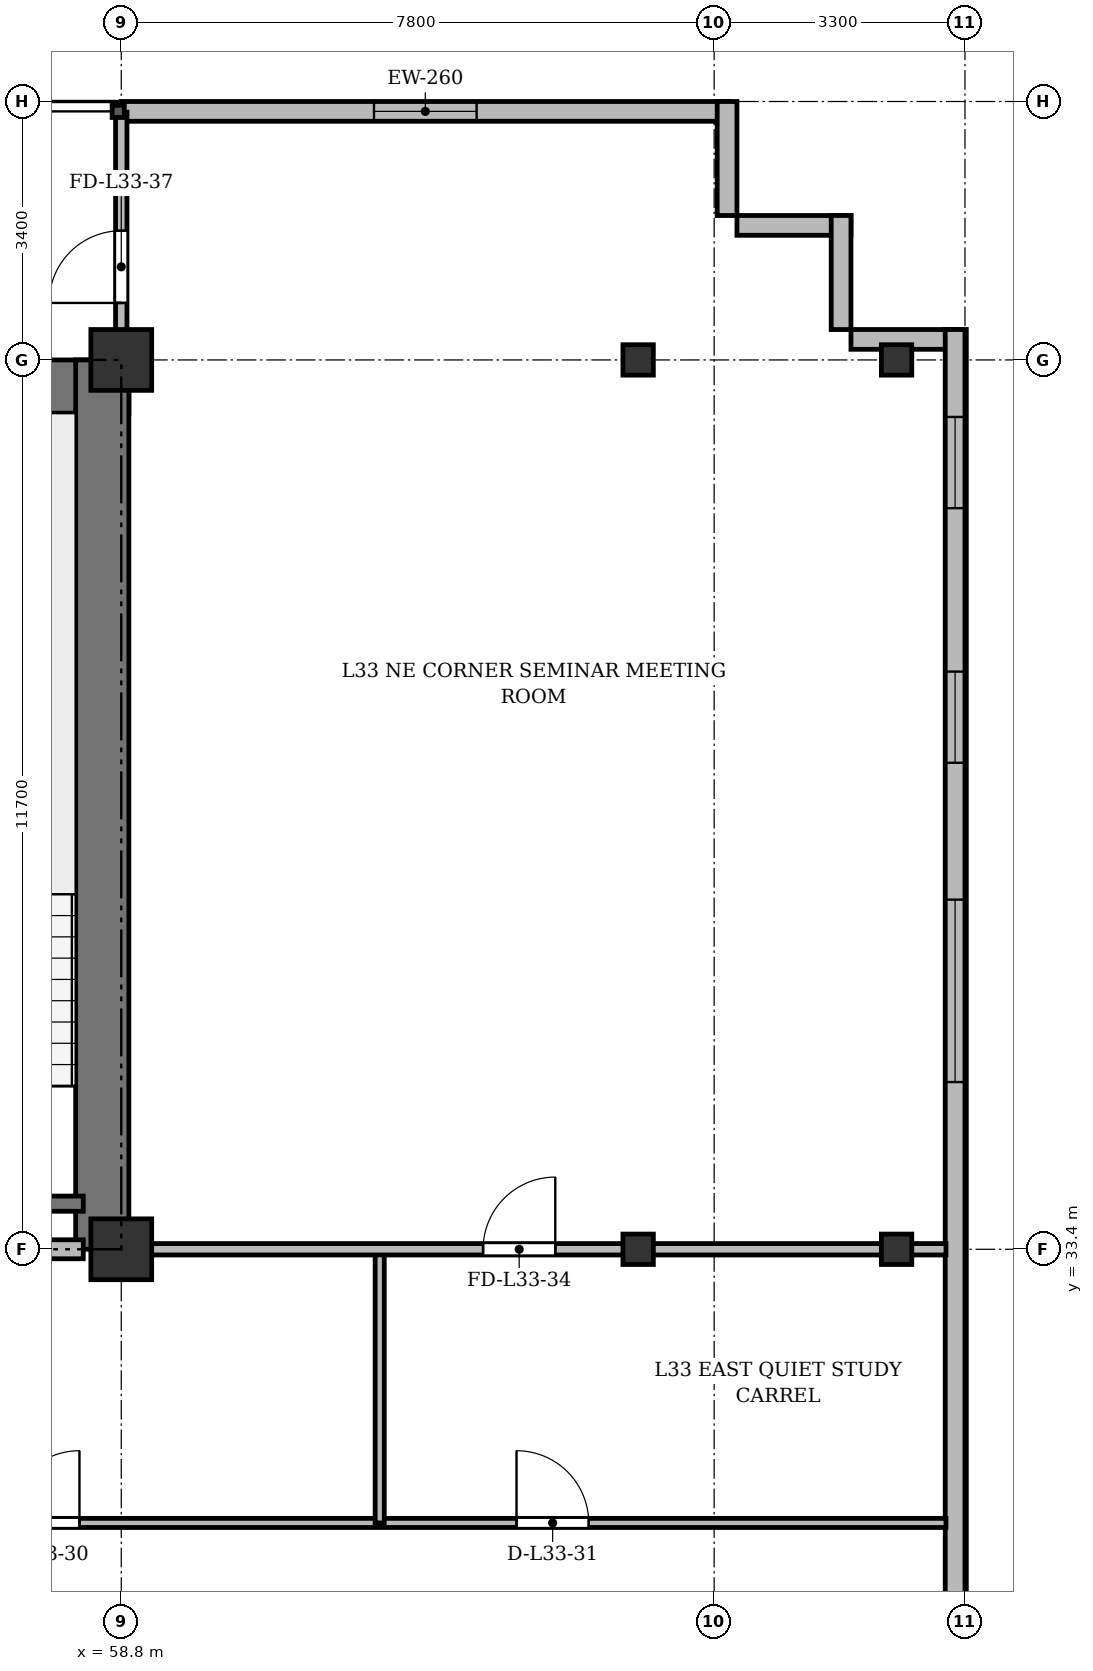
"""IFC4 building model, lengths in metres.
Left out: names, types, materials, properties, quantities, classifications, styles, units other than length and angle.
Written with IfcOpenShell. Run it as: python <this file> out.ifc"""

import sys

from ifc_helpers import new_model, si_unit, direction, frame, frame_2d, origin, origin_2d, place, context, subcontext, project, spatial, rectangle, i_section, extrude, source, transform, mapped, element, fill, save


model = new_model("IFC4")
c1 = context("Model", 3, precision=1e-05, world=origin(), true_north=direction((0.0, 1.0)))
c2 = subcontext(c1, "Body", "Model", "MODEL_VIEW")
j1 = project(units=[si_unit("LENGTHUNIT", "METRE"), si_unit("PLANEANGLEUNIT", "RADIAN")], contexts=[c1])
p1 = place(None, origin())
s1 = spatial("IfcSite", under=j1, at=p1, CompositionType="ELEMENT")
p2 = place(p1, origin())
s2 = spatial("IfcBuilding", under=s1, at=p2, CompositionType="ELEMENT")
p3 = place(p2, frame((0.0, 0.0, 128.5)))
s3 = spatial("IfcBuildingStorey", under=s2, at=p3, CompositionType="ELEMENT", Elevation=128.5)
m1 = source(origin(), c2, "Body", "SweptSolid", [
    extrude(rectangle(XDim=0.8, YDim=0.8, at=origin_2d()), origin(), (0.0, 0.0, 1.0), 3.6),
])
for number, where, z_axis, x_axis in (
    (1, (58.8, 33.4, 0.0), (0.0, 0.0, 1.0), (1.0, 0.0, 0.0)),
    (2, (58.8, 45.1, 0.0), (0.0, 0.0, 1.0), (1.0, 0.0, 0.0)),
):
    element("IfcColumn", number, at=place(p3, frame(where, z_axis=z_axis, x_axis=x_axis)), inside=s3, PredefinedType="COLUMN", context=c2, shape_type="MappedRepresentation", body=[
        mapped(m1, transform((0.0, 0.0, 0.0), x_axis=(1.0, 0.0, 0.0), y_axis=(0.0, 1.0, 0.0), z_axis=(0.0, 0.0, 1.0), scale=1.0)),
    ])
m2 = source(origin(), c2, "Body", "SweptSolid", [
    extrude(i_section(OverallWidth=0.4, OverallDepth=0.4, WebThickness=0.022, FlangeThickness=0.035, at=origin_2d()), origin(), (0.0, 0.0, 1.0), 3.6),
])
for number, where, z_axis, x_axis in (
    (3, (65.6, 33.4, 0.0), (0.0, 0.0, 1.0), (1.0, 0.0, 0.0)),
    (4, (65.6, 45.1, 0.0), (0.0, 0.0, 1.0), (1.0, 0.0, 0.0)),
    (5, (69.0, 33.4, 0.0), (0.0, 0.0, 1.0), (1.0, 0.0, 0.0)),
    (6, (69.0, 45.1, 0.0), (0.0, 0.0, 1.0), (1.0, 0.0, 0.0)),
):
    element("IfcColumn", number, at=place(p3, frame(where, z_axis=z_axis, x_axis=x_axis)), inside=s3, PredefinedType="COLUMN", context=c2, shape_type="MappedRepresentation", body=[
        mapped(m2, transform((0.0, 0.0, 0.0), x_axis=(1.0, 0.0, 0.0), y_axis=(0.0, 1.0, 0.0), z_axis=(0.0, 0.0, 1.0), scale=1.0)),
    ])
p4 = place(p3, frame((58.8, 48.37, 0.0), z_axis=(0.0, 0.0, 1.0), x_axis=(1.0, 0.0, 0.0)))
e7 = element("IfcWall", 7, at=p4, inside=s3, PredefinedType="SOLIDWALL", context=c2, shape_type="SweptSolid", body=[
    extrude(rectangle(XDim=8.0, YDim=0.26, at=frame_2d((4.0, 0.0))), origin(), (0.0, 0.0, 1.0), 3.22),
])
p5 = place(p4, frame((3.325, 0.0, 0.9)))
e8 = element("IfcOpeningElement", 8, at=p5, cuts=e7, PredefinedType="OPENING", context=c2, shape_type="SweptSolid", body=[
    extrude(rectangle(XDim=1.35, YDim=1.5, at=frame_2d((0.675, 0.75))), frame((0.0, 0.14, 0.0), z_axis=(0.0, -1.0, 0.0), x_axis=(1.0, 0.0, 0.0)), (0.0, 0.0, 1.0), 0.28),
])
for number, where, z_axis, x_axis in (
    (9, (66.77, 48.5, 0.0), (0.0, 0.0, 1.0), (0.0, -1.0, 0.0)),
    (10, (66.9, 46.87, 0.0), (0.0, 0.0, 1.0), (1.0, 0.0, 0.0)),
    (11, (68.27, 47.0, 0.0), (0.0, 0.0, 1.0), (0.0, -1.0, 0.0)),
):
    element("IfcWall", number, at=place(p3, frame(where, z_axis=z_axis, x_axis=x_axis)), inside=s3, PredefinedType="SOLIDWALL", context=c2, shape_type="SweptSolid", body=[
        extrude(rectangle(XDim=1.5, YDim=0.26, at=frame_2d((0.75, 0.0))), origin(), (0.0, 0.0, 1.0), 3.22),
    ])
p6 = place(p3, frame((68.4, 45.37, 0.0), z_axis=(0.0, 0.0, 1.0), x_axis=(1.0, 0.0, 0.0)))
e12 = element("IfcWall", 12, at=p6, inside=s3, PredefinedType="SOLIDWALL", context=c2, shape_type="SweptSolid", body=[
    extrude(rectangle(XDim=1.5, YDim=0.26, at=frame_2d((0.75, 0.0))), origin(), (0.0, 0.0, 1.0), 2.632),
])
p7 = place(p3, frame((69.77, 45.5, 0.0), z_axis=(0.0, 0.0, 1.0), x_axis=(0.0, -1.0, 0.0)))
e13 = element("IfcWall", 13, at=p7, inside=s3, PredefinedType="SOLIDWALL", context=c2, shape_type="SweptSolid", body=[
    extrude(rectangle(XDim=39.6, YDim=0.26, at=frame_2d((19.8, 0.0))), origin(), (0.0, 0.0, 1.0), 2.632),
])
p8 = place(p7, frame((36.95, 0.0, 0.92)))
e14 = element("IfcOpeningElement", 14, at=p8, cuts=e13, PredefinedType="OPENING", context=c2, shape_type="SweptSolid", body=[
    extrude(rectangle(XDim=1.2, YDim=1.61, at=frame_2d((0.6, 0.805))), frame((0.0, 0.14, 0.0), z_axis=(0.0, -1.0, 0.0), x_axis=(1.0, 0.0, 0.0)), (0.0, 0.0, 1.0), 0.28),
])
p9 = place(p7, frame((32.9, 0.0, 0.92)))
e15 = element("IfcOpeningElement", 15, at=p9, cuts=e13, PredefinedType="OPENING", context=c2, shape_type="SweptSolid", body=[
    extrude(rectangle(XDim=2.4, YDim=1.61, at=frame_2d((1.2, 0.805))), frame((0.0, 0.14, 0.0), z_axis=(0.0, -1.0, 0.0), x_axis=(1.0, 0.0, 0.0)), (0.0, 0.0, 1.0), 0.28),
])
p10 = place(p7, frame((28.7, 0.0, 0.92)))
e16 = element("IfcOpeningElement", 16, at=p10, cuts=e13, PredefinedType="OPENING", context=c2, shape_type="SweptSolid", body=[
    extrude(rectangle(XDim=2.4, YDim=1.61, at=frame_2d((1.2, 0.805))), frame((0.0, 0.14, 0.0), z_axis=(0.0, -1.0, 0.0), x_axis=(1.0, 0.0, 0.0)), (0.0, 0.0, 1.0), 0.28),
])
p11 = place(p7, frame((7.5, 0.0, 0.92)))
e17 = element("IfcOpeningElement", 17, at=p11, cuts=e13, PredefinedType="OPENING", context=c2, shape_type="SweptSolid", body=[
    extrude(rectangle(XDim=2.4, YDim=1.61, at=frame_2d((1.2, 0.805))), frame((0.0, 0.14, 0.0), z_axis=(0.0, -1.0, 0.0), x_axis=(1.0, 0.0, 0.0)), (0.0, 0.0, 1.0), 0.28),
])
p12 = place(p7, frame((4.5, 0.0, 0.92)))
e18 = element("IfcOpeningElement", 18, at=p12, cuts=e13, PredefinedType="OPENING", context=c2, shape_type="SweptSolid", body=[
    extrude(rectangle(XDim=1.2, YDim=1.61, at=frame_2d((0.6, 0.805))), frame((0.0, 0.14, 0.0), z_axis=(0.0, -1.0, 0.0), x_axis=(1.0, 0.0, 0.0)), (0.0, 0.0, 1.0), 0.28),
])
p13 = place(p7, frame((1.15, 0.0, 0.92)))
e19 = element("IfcOpeningElement", 19, at=p13, cuts=e13, PredefinedType="OPENING", context=c2, shape_type="SweptSolid", body=[
    extrude(rectangle(XDim=1.2, YDim=1.61, at=frame_2d((0.6, 0.805))), frame((0.0, 0.14, 0.0), z_axis=(0.0, -1.0, 0.0), x_axis=(1.0, 0.0, 0.0)), (0.0, 0.0, 1.0), 0.28),
])
p14 = place(p3, frame((15.5, 44.75, 0.0), z_axis=(0.0, 0.0, 1.0), x_axis=(1.0, 0.0, 0.0)))
e20 = element("IfcWall", 20, at=p14, inside=s3, PredefinedType="SHEAR", context=c2, shape_type="SweptSolid", body=[
    extrude(rectangle(XDim=43.4, YDim=0.7, at=frame_2d((21.7, 0.0))), origin(), (0.0, 0.0, 1.0), 3.22),
])
p15 = place(p3, frame((58.55, 33.4, 0.0), z_axis=(0.0, 0.0, 1.0), x_axis=(0.0, 1.0, 0.0)))
e21 = element("IfcWall", 21, at=p15, inside=s3, PredefinedType="SHEAR", context=c2, shape_type="SweptSolid", body=[
    extrude(rectangle(XDim=11.7, YDim=0.7, at=frame_2d((5.85, 0.0))), origin(), (0.0, 0.0, 1.0), 3.22),
])
p16 = place(p3, frame((54.9, 34.0, 0.0), z_axis=(0.0, 0.0, 1.0), x_axis=(1.0, 0.0, 0.0)))
e22 = element("IfcWall", 22, at=p16, inside=s3, PredefinedType="SHEAR", context=c2, shape_type="SweptSolid", body=[
    extrude(rectangle(XDim=3.4, YDim=0.2, at=frame_2d((1.7, 0.0))), origin(), (0.0, 0.0, 1.0), 3.22),
])
p17 = place(p3, frame((47.15, 33.4, 0.0), z_axis=(0.0, 0.0, 1.0), x_axis=(1.0, 0.0, 0.0)))
e23 = element("IfcWall", 23, at=p17, inside=s3, PredefinedType="PARTITIONING", context=c2, shape_type="SweptSolid", body=[
    extrude(rectangle(XDim=11.15, YDim=0.25, at=frame_2d((5.575, 0.0))), origin(), (0.0, 0.0, 1.0), 2.632),
])
p18 = place(p17, frame((0.7, 0.0, 0.0)))
e24 = element("IfcOpeningElement", 24, at=p18, cuts=e23, PredefinedType="OPENING", context=c2, shape_type="SweptSolid", body=[
    extrude(rectangle(XDim=0.95, YDim=2.15, at=frame_2d((0.475, 1.075))), frame((0.0, 0.135, 0.0), z_axis=(0.0, -1.0, 0.0), x_axis=(1.0, 0.0, 0.0)), (0.0, 0.0, 1.0), 0.27),
])
p19 = place(p17, frame((6.0, 0.0, 0.0)))
e25 = element("IfcOpeningElement", 25, at=p19, cuts=e23, PredefinedType="OPENING", context=c2, shape_type="SweptSolid", body=[
    extrude(rectangle(XDim=1.2, YDim=2.15, at=frame_2d((0.6, 1.075))), frame((0.0, 0.135, 0.0), z_axis=(0.0, -1.0, 0.0), x_axis=(1.0, 0.0, 0.0)), (0.0, 0.0, 1.0), 0.27),
])
p20 = place(p3, frame((54.8, 29.8, 0.0), z_axis=(0.0, 0.0, 1.0), x_axis=(1.0, 0.0, 0.0)))
e26 = element("IfcWall", 26, at=p20, inside=s3, PredefinedType="PARTITIONING", context=c2, shape_type="SweptSolid", body=[
    extrude(rectangle(XDim=14.85, YDim=0.12, at=frame_2d((7.425, 0.0))), origin(), (0.0, 0.0, 1.0), 2.72),
])
p21 = place(p20, frame((2.5, 0.0, 0.0)))
e27 = element("IfcOpeningElement", 27, at=p21, cuts=e26, PredefinedType="OPENING", context=c2, shape_type="SweptSolid", body=[
    extrude(rectangle(XDim=0.95, YDim=2.15, at=frame_2d((0.475, 1.075))), frame((0.0, 0.07, 0.0), z_axis=(0.0, -1.0, 0.0), x_axis=(1.0, 0.0, 0.0)), (0.0, 0.0, 1.0), 0.14),
])
p22 = place(p20, frame((9.2, 0.0, 0.0)))
e28 = element("IfcOpeningElement", 28, at=p22, cuts=e26, PredefinedType="OPENING", context=c2, shape_type="SweptSolid", body=[
    extrude(rectangle(XDim=0.95, YDim=2.15, at=frame_2d((0.475, 1.075))), frame((0.0, 0.07, 0.0), z_axis=(0.0, -1.0, 0.0), x_axis=(1.0, 0.0, 0.0)), (0.0, 0.0, 1.0), 0.14),
])
p23 = place(p3, frame((62.2, 29.8, 0.0), z_axis=(0.0, 0.0, 1.0), x_axis=(0.0, 1.0, 0.0)))
e29 = element("IfcWall", 29, at=p23, inside=s3, PredefinedType="PARTITIONING", context=c2, shape_type="SweptSolid", body=[
    extrude(rectangle(XDim=3.6, YDim=0.12, at=frame_2d((1.8, 0.0))), origin(), (0.0, 0.0, 1.0), 2.632),
])
p24 = place(p3, frame((58.8, 33.4, 0.0), z_axis=(0.0, 0.0, 1.0), x_axis=(1.0, 0.0, 0.0)))
e30 = element("IfcWall", 30, at=p24, inside=s3, PredefinedType="PARTITIONING", context=c2, shape_type="SweptSolid", body=[
    extrude(rectangle(XDim=10.85, YDim=0.15, at=frame_2d((5.425, 0.0))), origin(), (0.0, 0.0, 1.0), 2.632),
])
p25 = place(p24, frame((4.76, 0.0, 0.0)))
e31 = element("IfcOpeningElement", 31, at=p25, cuts=e30, PredefinedType="OPENING", context=c2, shape_type="SweptSolid", body=[
    extrude(rectangle(XDim=0.95, YDim=2.15, at=frame_2d((0.475, 1.075))), frame((0.0, 0.085, 0.0), z_axis=(0.0, -1.0, 0.0), x_axis=(1.0, 0.0, 0.0)), (0.0, 0.0, 1.0), 0.17),
])
p26 = place(p3, frame((58.8, 44.75, 0.0), z_axis=(0.0, 0.0, 1.0), x_axis=(0.0, 1.0, 0.0)))
e32 = element("IfcWall", 32, at=p26, inside=s3, PredefinedType="PARTITIONING", context=c2, shape_type="SweptSolid", body=[
    extrude(rectangle(XDim=3.61, YDim=0.15, at=frame_2d((1.805, 0.0))), origin(), (0.0, 0.0, 1.0), 2.72),
])
p27 = place(p26, frame((1.1, 0.0, 0.0)))
e33 = element("IfcOpeningElement", 33, at=p27, cuts=e32, PredefinedType="OPENING", context=c2, shape_type="SweptSolid", body=[
    extrude(rectangle(XDim=0.95, YDim=2.15, at=frame_2d((0.475, 1.075))), frame((0.0, 0.085, 0.0), z_axis=(0.0, -1.0, 0.0), x_axis=(1.0, 0.0, 0.0)), (0.0, 0.0, 1.0), 0.17),
])
m3 = source(origin(), c2, "Body", "SweptSolid", [
    extrude(rectangle(XDim=1.35, YDim=1.5, at=frame_2d((0.675, 0.75))), frame((0.0, 0.03, 0.0), z_axis=(0.0, -1.0, 0.0), x_axis=(1.0, 0.0, 0.0)), (0.0, 0.0, 1.0), 0.06),
])
p28 = place(p5, origin())
e34 = element("IfcWindow", 34, at=p28, inside=s3, PartitioningType="SINGLE_PANEL", PredefinedType="WINDOW", context=c2, shape_type="MappedRepresentation", body=[
    mapped(m3, transform((0.0, 0.0, 0.0), x_axis=(1.0, 0.0, 0.0), y_axis=(0.0, 1.0, 0.0), z_axis=(0.0, 0.0, 1.0), scale=1.0)),
])
fill(e8, e34)
m4 = source(origin(), c2, "Body", "SweptSolid", [
    extrude(rectangle(XDim=2.4, YDim=1.61, at=frame_2d((1.2, 0.805))), frame((0.0, 0.03, 0.0), z_axis=(0.0, -1.0, 0.0), x_axis=(1.0, 0.0, 0.0)), (0.0, 0.0, 1.0), 0.06),
])
p29 = place(p11, origin())
e35 = element("IfcWindow", 35, at=p29, inside=s3, PartitioningType="SINGLE_PANEL", PredefinedType="WINDOW", context=c2, shape_type="MappedRepresentation", body=[
    mapped(m4, transform((0.0, 0.0, 0.0), x_axis=(1.0, 0.0, 0.0), y_axis=(0.0, 1.0, 0.0), z_axis=(0.0, 0.0, 1.0), scale=1.0)),
])
fill(e17, e35)
m5 = source(origin(), c2, "Body", "SweptSolid", [
    extrude(rectangle(XDim=1.2, YDim=1.61, at=frame_2d((0.6, 0.805))), frame((0.0, 0.03, 0.0), z_axis=(0.0, -1.0, 0.0), x_axis=(1.0, 0.0, 0.0)), (0.0, 0.0, 1.0), 0.06),
])
p30 = place(p12, origin())
e36 = element("IfcWindow", 36, at=p30, inside=s3, PartitioningType="SINGLE_PANEL", PredefinedType="WINDOW", context=c2, shape_type="MappedRepresentation", body=[
    mapped(m5, transform((0.0, 0.0, 0.0), x_axis=(1.0, 0.0, 0.0), y_axis=(0.0, 1.0, 0.0), z_axis=(0.0, 0.0, 1.0), scale=1.0)),
])
fill(e18, e36)
p31 = place(p13, origin())
e37 = element("IfcWindow", 37, at=p31, inside=s3, PartitioningType="SINGLE_PANEL", PredefinedType="WINDOW", context=c2, shape_type="MappedRepresentation", body=[
    mapped(m5, transform((0.0, 0.0, 0.0), x_axis=(1.0, 0.0, 0.0), y_axis=(0.0, 1.0, 0.0), z_axis=(0.0, 0.0, 1.0), scale=1.0)),
])
fill(e19, e37)
m6 = source(origin(), c2, "Body", "SweptSolid", [
    extrude(rectangle(XDim=0.95, YDim=2.15, at=frame_2d((0.475, 1.075))), frame((0.0, 0.025, 0.0), z_axis=(0.0, -1.0, 0.0), x_axis=(1.0, 0.0, 0.0)), (0.0, 0.0, 1.0), 0.05),
])
p32 = place(p21, origin())
e38 = element("IfcDoor", 38, at=p32, inside=s3, OperationType="SINGLE_SWING_RIGHT", PredefinedType="DOOR", context=c2, shape_type="MappedRepresentation", body=[
    mapped(m6, transform((0.0, 0.0, 0.0), x_axis=(1.0, 0.0, 0.0), y_axis=(0.0, 1.0, 0.0), z_axis=(0.0, 0.0, 1.0), scale=1.0)),
])
fill(e27, e38)
p33 = place(p22, origin())
e39 = element("IfcDoor", 39, at=p33, inside=s3, OperationType="SINGLE_SWING_LEFT", PredefinedType="DOOR", context=c2, shape_type="MappedRepresentation", body=[
    mapped(m6, transform((0.0, 0.0, 0.0), x_axis=(1.0, 0.0, 0.0), y_axis=(0.0, 1.0, 0.0), z_axis=(0.0, 0.0, 1.0), scale=1.0)),
])
fill(e28, e39)
p34 = place(p25, origin())
e40 = element("IfcDoor", 40, at=p34, inside=s3, OperationType="SINGLE_SWING_RIGHT", PredefinedType="DOOR", context=c2, shape_type="MappedRepresentation", body=[
    mapped(m6, transform((0.0, 0.0, 0.0), x_axis=(1.0, 0.0, 0.0), y_axis=(0.0, 1.0, 0.0), z_axis=(0.0, 0.0, 1.0), scale=1.0)),
])
fill(e31, e40)
p35 = place(p27, origin())
e41 = element("IfcDoor", 41, at=p35, inside=s3, OperationType="SINGLE_SWING_LEFT", PredefinedType="DOOR", context=c2, shape_type="MappedRepresentation", body=[
    mapped(m6, transform((0.0, 0.0, 0.0), x_axis=(1.0, 0.0, 0.0), y_axis=(0.0, 1.0, 0.0), z_axis=(0.0, 0.0, 1.0), scale=1.0)),
])
fill(e33, e41)
save(model, sys.argv[1])
